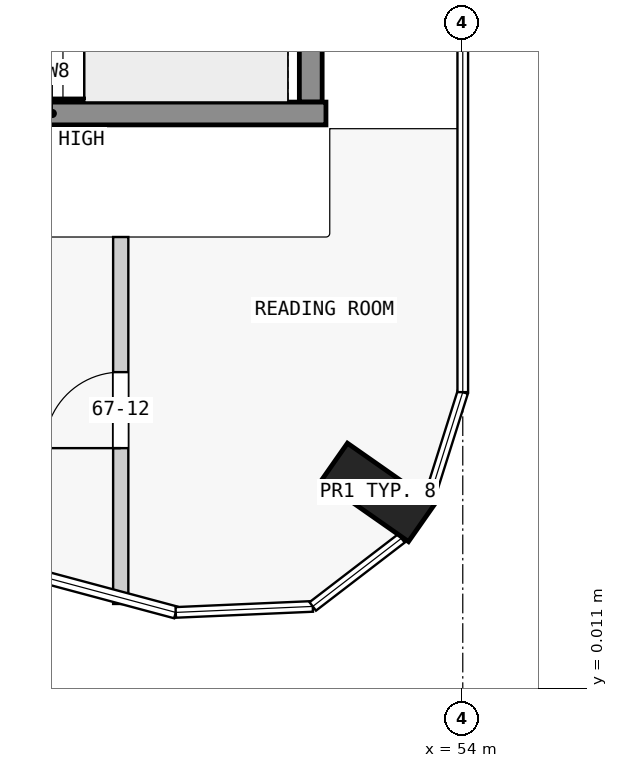
"""IFC4 building model, lengths in metres.
Left out: names, types, materials, properties, quantities, classifications, styles, units other than length and angle.
Written with IfcOpenShell. Run it as: python <this file> out.ifc"""

import sys

from ifc_helpers import new_model, si_unit, direction, frame, frame_2d, origin, origin_2d, place, context, subcontext, project, spatial, rectangle, extrude, element, fill, save


model = new_model("IFC4")
c1 = context("Model", 3, precision=1e-05, world=origin(), true_north=direction((0.0, 1.0)))
c2 = subcontext(c1, "Body", "Model", "MODEL_VIEW")
j1 = project(units=[si_unit("LENGTHUNIT", "METRE"), si_unit("PLANEANGLEUNIT", "RADIAN")], contexts=[c1])
p1 = place(None, origin())
s1 = spatial("IfcSite", under=j1, at=p1, CompositionType="ELEMENT")
p2 = place(p1, origin())
s2 = spatial("IfcBuilding", under=s1, at=p2, CompositionType="ELEMENT")
p3 = place(p2, frame((0.0, 0.0, 256.4)))
s3 = spatial("IfcBuildingStorey", under=s2, at=p3, CompositionType="ELEMENT", Elevation=256.4)
p4 = place(p3, frame((52.884, 2.59, 0.0), z_axis=(0.0, 0.0, 1.0), x_axis=(0.573542637991, 0.819175709117, 0.0)))
e1 = element("IfcColumn", 1, at=p4, inside=s3, PredefinedType="COLUMN", context=c2, shape_type="SweptSolid", body=[
    extrude(rectangle(XDim=0.6, YDim=1.4, at=origin_2d()), origin(), (0.0, 0.0, 1.0), 3.5),
])
p5 = place(p3, frame((52.0, 7.725, 0.0), z_axis=(0.0, 0.0, 1.0), x_axis=(0.0, 1.0, 0.0)))
e2 = element("IfcWall", 2, at=p5, inside=s3, PredefinedType="SHEAR", context=c2, shape_type="SweptSolid", body=[
    extrude(rectangle(XDim=2.55, YDim=0.3, at=frame_2d((1.275, 0.0))), origin(), (0.0, 0.0, 1.0), 3.5),
])
p6 = place(p3, frame((45.0, 7.575, 0.0), z_axis=(0.0, 0.0, 1.0), x_axis=(1.0, 0.0, 0.0)))
e3 = element("IfcWall", 3, at=p6, inside=s3, PredefinedType="SHEAR", context=c2, shape_type="SweptSolid", body=[
    extrude(rectangle(XDim=7.2, YDim=0.3, at=frame_2d((3.6, 0.0))), origin(), (0.0, 0.0, 1.0), 3.5),
])
p7 = place(p3, frame((49.5, 1.122, 0.0), z_axis=(0.0, 0.0, 1.0), x_axis=(0.0, 1.0, 0.0)))
e4 = element("IfcWall", 4, at=p7, inside=s3, PredefinedType="PARTITIONING", context=c2, shape_type="SweptSolid", body=[
    extrude(rectangle(XDim=4.828, YDim=0.2, at=frame_2d((2.414, 0.0))), origin(), (0.0, 0.0, 1.0), 3.25),
])
p8 = place(p7, frame((2.05, 0.0, 0.0)))
e5 = element("IfcOpeningElement", 5, at=p8, cuts=e4, PredefinedType="OPENING", context=c2, shape_type="SweptSolid", body=[
    extrude(rectangle(XDim=1.0, YDim=2.1, at=frame_2d((0.5, 1.05))), frame((0.0, 0.11, 0.0), z_axis=(0.0, -1.0, 0.0), x_axis=(1.0, 0.0, 0.0)), (0.0, 0.0, 1.0), 0.22),
])
p9 = place(p8, origin())
e6 = element("IfcDoor", 6, at=p9, inside=s3, OperationType="SINGLE_SWING_RIGHT", PredefinedType="DOOR", context=c2, shape_type="SweptSolid", body=[
    extrude(rectangle(XDim=1.0, YDim=2.1, at=frame_2d((0.5, 1.05))), frame((0.0, 0.025, 0.0), z_axis=(0.0, -1.0, 0.0), x_axis=(1.0, 0.0, 0.0)), (0.0, 0.0, 1.0), 0.05),
])
fill(e5, e6)
save(model, sys.argv[1])
